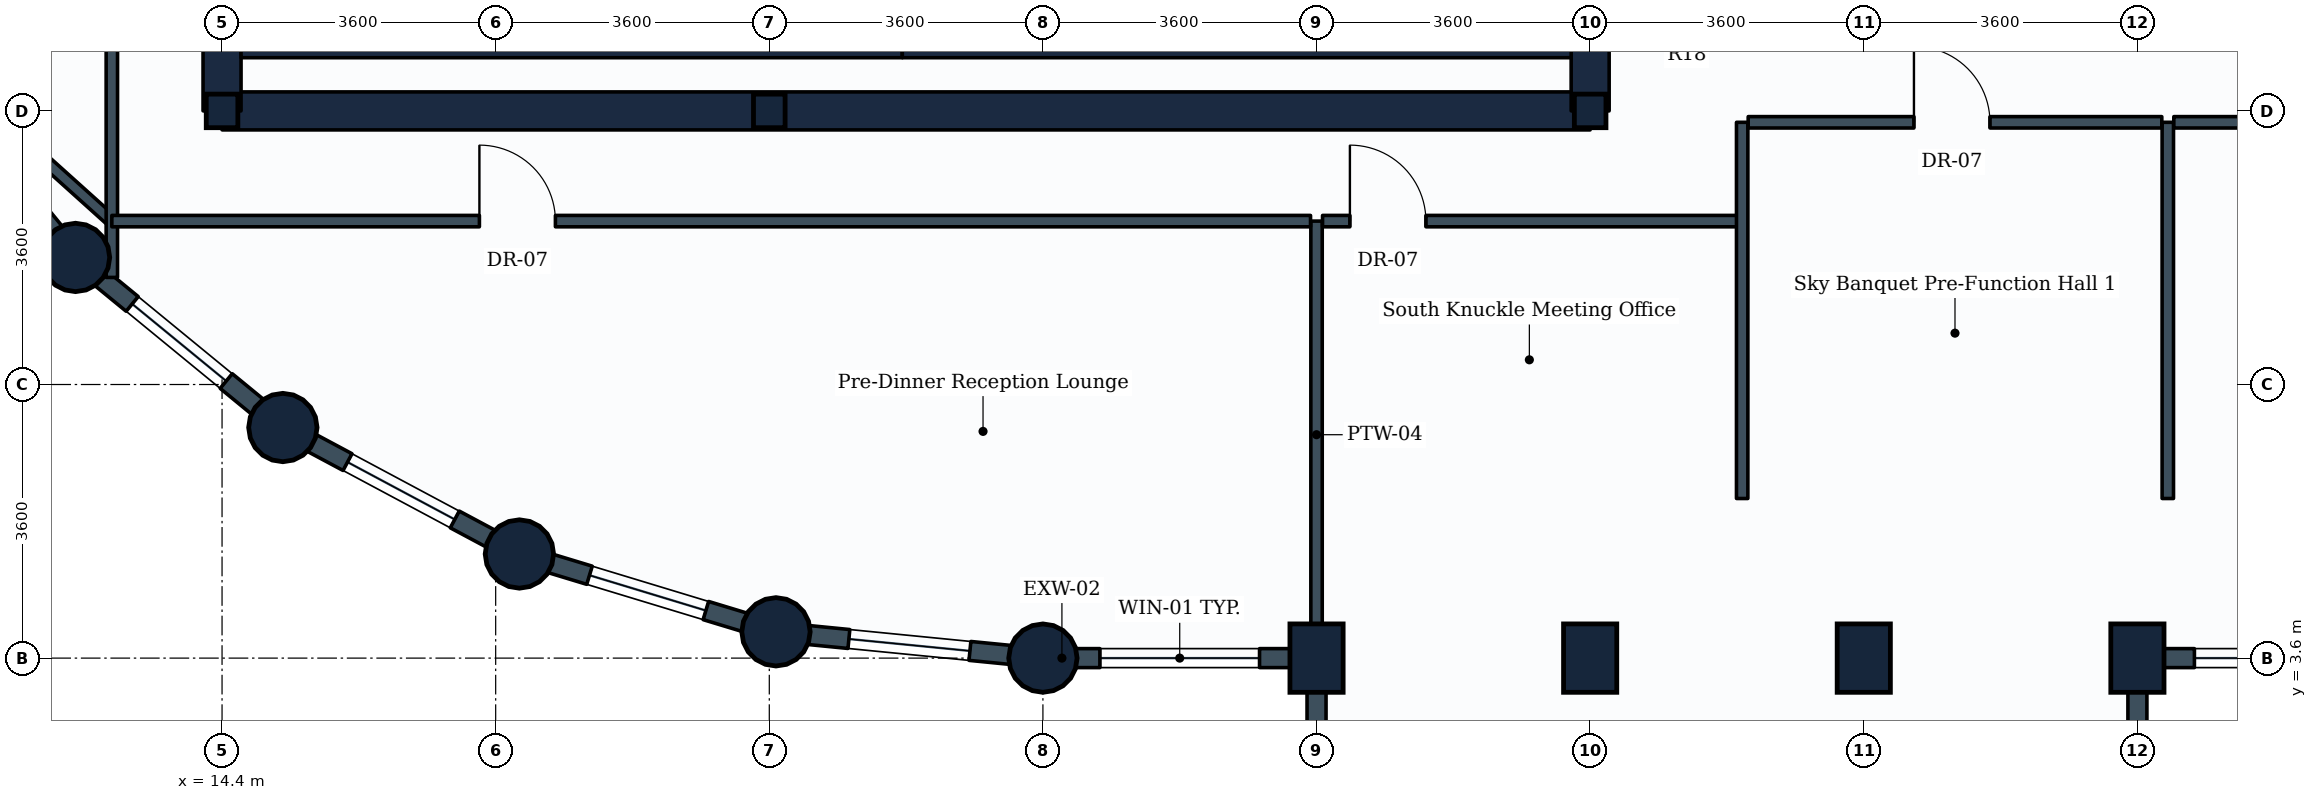
"""IFC4 building model, lengths in metres.
Left out: names, types, materials, properties, quantities, classifications, styles, units other than length and angle.
Written with IfcOpenShell. Run it as: python <this file> out.ifc"""

import sys

from ifc_helpers import new_model, si_unit, direction, frame, frame_2d, origin, origin_2d, place, context, subcontext, project, spatial, rectangle, circle, i_section, extrude, element, fill, save


model = new_model("IFC4")
c1 = context("Model", 3, precision=1e-05, world=origin(), true_north=direction((0.0, 1.0)))
c2 = subcontext(c1, "Body", "Model", "MODEL_VIEW")
j1 = project(units=[si_unit("LENGTHUNIT", "METRE"), si_unit("PLANEANGLEUNIT", "RADIAN")], contexts=[c1])
p1 = place(None, origin())
s1 = spatial("IfcSite", under=j1, at=p1, CompositionType="ELEMENT")
p2 = place(p1, origin())
s2 = spatial("IfcBuilding", under=s1, at=p2, CompositionType="ELEMENT")
p3 = place(p2, frame((0.0, 0.0, 201.4)))
s3 = spatial("IfcBuildingStorey", under=s2, at=p3, CompositionType="ELEMENT", Elevation=201.4)
p4 = place(p3, frame((12.472, 8.872, 0.0), z_axis=(0.0, 0.0, 1.0), x_axis=(1.0, 0.0, 0.0)))
e1 = element("IfcColumn", 1, at=p4, inside=s3, PredefinedType="COLUMN", context=c2, shape_type="SweptSolid", body=[
    extrude(circle(Radius=0.45, at=origin_2d()), origin(), (0.0, 0.0, 1.0), 3.8),
])
p5 = place(p3, frame((14.4, 10.8, 0.0), z_axis=(0.0, 0.0, 1.0), x_axis=(1.0, 0.0, 0.0)))
e2 = element("IfcColumn", 2, at=p5, inside=s3, PredefinedType="COLUMN", context=c2, shape_type="SweptSolid", body=[
    extrude(i_section(OverallWidth=0.416, OverallDepth=0.442, WebThickness=0.025, FlangeThickness=0.041, FilletRadius=0.015, at=origin_2d()), origin(), (0.0, 0.0, 1.0), 3.8),
])
for number, where, z_axis, x_axis in (
    (3, (15.2, 6.634, 0.0), (0.0, 0.0, 1.0), (1.0, 0.0, 0.0)),
    (4, (18.312, 4.97, 0.0), (0.0, 0.0, 1.0), (1.0, 0.0, 0.0)),
):
    element("IfcColumn", number, at=place(p3, frame(where, z_axis=z_axis, x_axis=x_axis)), inside=s3, PredefinedType="COLUMN", context=c2, shape_type="SweptSolid", body=[
        extrude(circle(Radius=0.45, at=origin_2d()), origin(), (0.0, 0.0, 1.0), 3.8),
    ])
p6 = place(p3, frame((21.6, 10.8, 0.0), z_axis=(0.0, 0.0, 1.0), x_axis=(1.0, 0.0, 0.0)))
e5 = element("IfcColumn", 5, at=p6, inside=s3, PredefinedType="COLUMN", context=c2, shape_type="SweptSolid", body=[
    extrude(i_section(OverallWidth=0.416, OverallDepth=0.442, WebThickness=0.025, FlangeThickness=0.041, FilletRadius=0.015, at=origin_2d()), origin(), (0.0, 0.0, 1.0), 3.8),
])
for number, where, z_axis, x_axis in (
    (6, (21.688, 3.946, 0.0), (0.0, 0.0, 1.0), (1.0, 0.0, 0.0)),
    (7, (25.2, 3.6, 0.0), (0.0, 0.0, 1.0), (1.0, 0.0, 0.0)),
):
    element("IfcColumn", number, at=place(p3, frame(where, z_axis=z_axis, x_axis=x_axis)), inside=s3, PredefinedType="COLUMN", context=c2, shape_type="SweptSolid", body=[
        extrude(circle(Radius=0.45, at=origin_2d()), origin(), (0.0, 0.0, 1.0), 3.8),
    ])
for number, where, z_axis, x_axis in (
    (8, (28.8, 3.6, 0.0), (0.0, 0.0, 1.0), (1.0, 0.0, 0.0)),
    (9, (32.4, 3.6, 0.0), (0.0, 0.0, 1.0), (1.0, 0.0, 0.0)),
):
    element("IfcColumn", number, at=place(p3, frame(where, z_axis=z_axis, x_axis=x_axis)), inside=s3, PredefinedType="COLUMN", context=c2, shape_type="SweptSolid", body=[
        extrude(rectangle(XDim=0.7, YDim=0.9, at=origin_2d()), origin(), (0.0, 0.0, 1.0), 3.8),
    ])
p7 = place(p3, frame((32.4, 10.8, 0.0), z_axis=(0.0, 0.0, 1.0), x_axis=(1.0, 0.0, 0.0)))
e10 = element("IfcColumn", 10, at=p7, inside=s3, PredefinedType="COLUMN", context=c2, shape_type="SweptSolid", body=[
    extrude(i_section(OverallWidth=0.416, OverallDepth=0.442, WebThickness=0.025, FlangeThickness=0.041, FilletRadius=0.015, at=origin_2d()), origin(), (0.0, 0.0, 1.0), 3.8),
])
for number, where, z_axis, x_axis in (
    (11, (36.0, 3.6, 0.0), (0.0, 0.0, 1.0), (1.0, 0.0, 0.0)),
    (12, (39.6, 3.6, 0.0), (0.0, 0.0, 1.0), (1.0, 0.0, 0.0)),
):
    element("IfcColumn", number, at=place(p3, frame(where, z_axis=z_axis, x_axis=x_axis)), inside=s3, PredefinedType="COLUMN", context=c2, shape_type="SweptSolid", body=[
        extrude(rectangle(XDim=0.7, YDim=0.9, at=origin_2d()), origin(), (0.0, 0.0, 1.0), 3.8),
    ])
p8 = place(p3, frame((28.8, 3.6, 0.0), z_axis=(0.0, 0.0, 1.0), x_axis=(-1.0, 0.0, 0.0)))
e13 = element("IfcWall", 13, at=p8, inside=s3, PredefinedType="STANDARD", context=c2, shape_type="SweptSolid", body=[
    extrude(rectangle(XDim=3.6, YDim=0.25, at=frame_2d((1.8, 0.0))), origin(), (0.0, 0.0, 1.0), 2.93),
])
p9 = place(p8, frame((0.75, 0.0, 0.85)))
e14 = element("IfcOpeningElement", 14, at=p9, cuts=e13, PredefinedType="OPENING", context=c2, shape_type="SweptSolid", body=[
    extrude(rectangle(XDim=2.1, YDim=1.35, at=frame_2d((1.05, 0.675))), frame((0.0, 0.135, 0.0), z_axis=(0.0, -1.0, 0.0), x_axis=(1.0, 0.0, 0.0)), (0.0, 0.0, 1.0), 0.27),
])
for number, where, z_axis, x_axis in (
    (15, (28.8, 3.6, 0.0), (0.0, 0.0, 1.0), (0.0, -1.0, 0.0)),
    (16, (39.6, 3.6, 0.0), (0.0, 0.0, 1.0), (0.0, -1.0, 0.0)),
):
    element("IfcWall", number, at=place(p3, frame(where, z_axis=z_axis, x_axis=x_axis)), inside=s3, PredefinedType="STANDARD", context=c2, shape_type="SweptSolid", body=[
        extrude(rectangle(XDim=2.1, YDim=0.25, at=frame_2d((1.05, 0.0))), origin(), (0.0, 0.0, 1.0), 2.93),
    ])
p10 = place(p3, frame((43.2, 3.6, 0.0), z_axis=(0.0, 0.0, 1.0), x_axis=(-1.0, 0.0, 0.0)))
e17 = element("IfcWall", 17, at=p10, inside=s3, PredefinedType="STANDARD", context=c2, shape_type="SweptSolid", body=[
    extrude(rectangle(XDim=3.6, YDim=0.25, at=frame_2d((1.8, 0.0))), origin(), (0.0, 0.0, 1.0), 2.93),
])
p11 = place(p10, frame((0.75, 0.0, 0.85)))
e18 = element("IfcOpeningElement", 18, at=p11, cuts=e17, PredefinedType="OPENING", context=c2, shape_type="SweptSolid", body=[
    extrude(rectangle(XDim=2.1, YDim=1.35, at=frame_2d((1.05, 0.675))), frame((0.0, 0.135, 0.0), z_axis=(0.0, -1.0, 0.0), x_axis=(1.0, 0.0, 0.0)), (0.0, 0.0, 1.0), 0.27),
])
p12 = place(p3, frame((12.472, 8.872, 0.0), z_axis=(0.0, 0.0, 1.0), x_axis=(-0.634258295121, 0.773121216285, 0.0)))
e19 = element("IfcWall", 19, at=p12, inside=s3, PredefinedType="STANDARD", context=c2, shape_type="SweptSolid", body=[
    extrude(rectangle(XDim=3.529, YDim=0.25, at=frame_2d((1.764, 0.0))), origin(), (0.0, 0.0, 1.0), 2.93),
])
p13 = place(p12, frame((0.964, 0.0, 0.85)))
e20 = element("IfcOpeningElement", 20, at=p13, cuts=e19, PredefinedType="OPENING", context=c2, shape_type="SweptSolid", body=[
    extrude(rectangle(XDim=1.6, YDim=1.35, at=frame_2d((0.8, 0.675))), frame((0.0, 0.135, 0.0), z_axis=(0.0, -1.0, 0.0), x_axis=(1.0, 0.0, 0.0)), (0.0, 0.0, 1.0), 0.27),
])
p14 = place(p3, frame((15.2, 6.634, 0.0), z_axis=(0.0, 0.0, 1.0), x_axis=(-0.773121216285, 0.634258295121, 0.0)))
e21 = element("IfcWall", 21, at=p14, inside=s3, PredefinedType="STANDARD", context=c2, shape_type="SweptSolid", body=[
    extrude(rectangle(XDim=3.529, YDim=0.25, at=frame_2d((1.764, 0.0))), origin(), (0.0, 0.0, 1.0), 2.93),
])
p15 = place(p14, frame((0.964, 0.0, 0.85)))
e22 = element("IfcOpeningElement", 22, at=p15, cuts=e21, PredefinedType="OPENING", context=c2, shape_type="SweptSolid", body=[
    extrude(rectangle(XDim=1.6, YDim=1.35, at=frame_2d((0.8, 0.675))), frame((0.0, 0.135, 0.0), z_axis=(0.0, -1.0, 0.0), x_axis=(1.0, 0.0, 0.0)), (0.0, 0.0, 1.0), 0.27),
])
p16 = place(p3, frame((18.312, 4.97, 0.0), z_axis=(0.0, 0.0, 1.0), x_axis=(-0.881846862014, 0.471535907389, 0.0)))
e23 = element("IfcWall", 23, at=p16, inside=s3, PredefinedType="STANDARD", context=c2, shape_type="SweptSolid", body=[
    extrude(rectangle(XDim=3.529, YDim=0.25, at=frame_2d((1.765, 0.0))), origin(), (0.0, 0.0, 1.0), 2.93),
])
p17 = place(p16, frame((0.964, 0.0, 0.85)))
e24 = element("IfcOpeningElement", 24, at=p17, cuts=e23, PredefinedType="OPENING", context=c2, shape_type="SweptSolid", body=[
    extrude(rectangle(XDim=1.6, YDim=1.35, at=frame_2d((0.8, 0.675))), frame((0.0, 0.135, 0.0), z_axis=(0.0, -1.0, 0.0), x_axis=(1.0, 0.0, 0.0)), (0.0, 0.0, 1.0), 0.27),
])
p18 = place(p3, frame((21.688, 3.946, 0.0), z_axis=(0.0, 0.0, 1.0), x_axis=(-0.956953367403, 0.290241714123, 0.0)))
e25 = element("IfcWall", 25, at=p18, inside=s3, PredefinedType="STANDARD", context=c2, shape_type="SweptSolid", body=[
    extrude(rectangle(XDim=3.528, YDim=0.25, at=frame_2d((1.764, 0.0))), origin(), (0.0, 0.0, 1.0), 2.93),
])
p19 = place(p18, frame((0.964, 0.0, 0.85)))
e26 = element("IfcOpeningElement", 26, at=p19, cuts=e25, PredefinedType="OPENING", context=c2, shape_type="SweptSolid", body=[
    extrude(rectangle(XDim=1.6, YDim=1.35, at=frame_2d((0.8, 0.675))), frame((0.0, 0.135, 0.0), z_axis=(0.0, -1.0, 0.0), x_axis=(1.0, 0.0, 0.0)), (0.0, 0.0, 1.0), 0.27),
])
p20 = place(p3, frame((25.2, 3.6, 0.0), z_axis=(0.0, 0.0, 1.0), x_axis=(-0.995183369056, 0.098030923459, 0.0)))
e27 = element("IfcWall", 27, at=p20, inside=s3, PredefinedType="STANDARD", context=c2, shape_type="SweptSolid", body=[
    extrude(rectangle(XDim=3.529, YDim=0.25, at=frame_2d((1.765, 0.0))), origin(), (0.0, 0.0, 1.0), 2.93),
])
p21 = place(p20, frame((0.965, 0.0, 0.85)))
e28 = element("IfcOpeningElement", 28, at=p21, cuts=e27, PredefinedType="OPENING", context=c2, shape_type="SweptSolid", body=[
    extrude(rectangle(XDim=1.6, YDim=1.35, at=frame_2d((0.8, 0.675))), frame((0.0, 0.135, 0.0), z_axis=(0.0, -1.0, 0.0), x_axis=(1.0, 0.0, 0.0)), (0.0, 0.0, 1.0), 0.27),
])
p22 = place(p3, frame((14.4, 10.8, 0.0), z_axis=(0.0, 0.0, 1.0), x_axis=(1.0, 0.0, 0.0)))
e29 = element("IfcWall", 29, at=p22, inside=s3, PredefinedType="SHEAR", context=c2, shape_type="SweptSolid", body=[
    extrude(rectangle(XDim=18.0, YDim=0.5, at=frame_2d((9.0, 0.0))), origin(), (0.0, 0.0, 1.0), 3.55),
])
p23 = place(p3, frame((14.4, 10.8, 0.0), z_axis=(0.0, 0.0, 1.0), x_axis=(0.0, 1.0, 0.0)))
e30 = element("IfcWall", 30, at=p23, inside=s3, PredefinedType="SHEAR", context=c2, shape_type="SweptSolid", body=[
    extrude(rectangle(XDim=14.4, YDim=0.5, at=frame_2d((7.2, 0.0))), origin(), (0.0, 0.0, 1.0), 3.55),
])
p24 = place(p23, frame((11.05, 0.0, 0.0)))
e31 = element("IfcOpeningElement", 31, at=p24, cuts=e30, PredefinedType="OPENING", context=c2, shape_type="SweptSolid", body=[
    extrude(rectangle(XDim=1.1, YDim=2.1, at=frame_2d((0.55, 1.05))), frame((0.0, 0.26, 0.0), z_axis=(0.0, -1.0, 0.0), x_axis=(1.0, 0.0, 0.0)), (0.0, 0.0, 1.0), 0.52),
])
p25 = place(p23, frame((4.9, 0.0, 0.0)))
e32 = element("IfcOpeningElement", 32, at=p25, cuts=e30, PredefinedType="OPENING", context=c2, shape_type="SweptSolid", body=[
    extrude(rectangle(XDim=1.2, YDim=2.1, at=frame_2d((0.6, 1.05))), frame((0.0, 0.26, 0.0), z_axis=(0.0, -1.0, 0.0), x_axis=(1.0, 0.0, 0.0)), (0.0, 0.0, 1.0), 0.52),
])
p26 = place(p3, frame((32.4, 10.8, 0.0), z_axis=(0.0, 0.0, 1.0), x_axis=(0.0, 1.0, 0.0)))
e33 = element("IfcWall", 33, at=p26, inside=s3, PredefinedType="SHEAR", context=c2, shape_type="SweptSolid", body=[
    extrude(rectangle(XDim=14.4, YDim=0.5, at=frame_2d((7.2, 0.0))), origin(), (0.0, 0.0, 1.0), 3.55),
])
p27 = place(p26, frame((4.35, 0.0, 0.0)))
e34 = element("IfcOpeningElement", 34, at=p27, cuts=e33, PredefinedType="OPENING", context=c2, shape_type="SweptSolid", body=[
    extrude(rectangle(XDim=1.2, YDim=2.1, at=frame_2d((0.6, 1.05))), frame((0.0, 0.26, 0.0), z_axis=(0.0, -1.0, 0.0), x_axis=(1.0, 0.0, 0.0)), (0.0, 0.0, 1.0), 0.52),
])
p28 = place(p26, frame((10.0, 0.0, 0.0)))
e35 = element("IfcOpeningElement", 35, at=p28, cuts=e33, PredefinedType="OPENING", context=c2, shape_type="SweptSolid", body=[
    extrude(rectangle(XDim=1.2, YDim=2.1, at=frame_2d((0.6, 1.05))), frame((0.0, 0.26, 0.0), z_axis=(0.0, -1.0, 0.0), x_axis=(1.0, 0.0, 0.0)), (0.0, 0.0, 1.0), 0.52),
])
p29 = place(p3, frame((14.65, 11.625, 0.0), z_axis=(0.0, 0.0, 1.0), x_axis=(1.0, 0.0, 0.0)))
e36 = element("IfcWall", 36, at=p29, inside=s3, PredefinedType="SHEAR", context=c2, shape_type="SweptSolid", body=[
    extrude(rectangle(XDim=8.7, YDim=0.25, at=frame_2d((4.35, 0.0))), origin(), (0.0, 0.0, 1.0), 3.55),
])
p30 = place(p3, frame((23.35, 11.625, 0.0), z_axis=(0.0, 0.0, 1.0), x_axis=(1.0, 0.0, 0.0)))
e37 = element("IfcWall", 37, at=p30, inside=s3, PredefinedType="SHEAR", context=c2, shape_type="SweptSolid", body=[
    extrude(rectangle(XDim=8.8, YDim=0.25, at=frame_2d((4.4, 0.0))), origin(), (0.0, 0.0, 1.0), 3.55),
])
p31 = place(p3, frame((28.8, 9.35, 0.0), z_axis=(0.0, 0.0, 1.0), x_axis=(0.0, -1.0, 0.0)))
e38 = element("IfcWall", 38, at=p31, inside=s3, PredefinedType="PARTITIONING", context=c2, shape_type="SweptSolid", body=[
    extrude(rectangle(XDim=5.621, YDim=0.15, at=frame_2d((2.811, 0.0))), origin(), (0.0, 0.0, 1.0), 3.535),
])
p32 = place(p3, frame((12.95, 9.35, 0.0), z_axis=(0.0, 0.0, 1.0), x_axis=(-0.74362269849, 0.668599493187, 0.0)))
e39 = element("IfcWall", 39, at=p32, inside=s3, PredefinedType="PARTITIONING", context=c2, shape_type="SweptSolid", body=[
    extrude(rectangle(XDim=3.472, YDim=0.15, at=frame_2d((1.736, 0.0))), origin(), (0.0, 0.0, 1.0), 2.93),
])
p33 = place(p3, frame((12.95, 8.609, 0.0), z_axis=(0.0, 0.0, 1.0), x_axis=(0.0, 1.0, 0.0)))
e40 = element("IfcWall", 40, at=p33, inside=s3, PredefinedType="PARTITIONING", context=c2, shape_type="SweptSolid", body=[
    extrude(rectangle(XDim=7.912, YDim=0.15, at=frame_2d((3.956, 0.0))), origin(), (0.0, 0.0, 1.0), 2.93),
])
p34 = place(p33, frame((4.972, 0.0, 0.0)))
e41 = element("IfcOpeningElement", 41, at=p34, cuts=e40, PredefinedType="OPENING", context=c2, shape_type="SweptSolid", body=[
    extrude(rectangle(XDim=1.0, YDim=2.1, at=frame_2d((0.5, 1.05))), frame((0.0, 0.085, 0.0), z_axis=(0.0, -1.0, 0.0), x_axis=(1.0, 0.0, 0.0)), (0.0, 0.0, 1.0), 0.17),
])
p35 = place(p3, frame((12.95, 9.35, 0.0), z_axis=(0.0, 0.0, 1.0), x_axis=(1.0, 0.0, 0.0)))
e42 = element("IfcWall", 42, at=p35, inside=s3, PredefinedType="PARTITIONING", context=c2, shape_type="SweptSolid", body=[
    extrude(rectangle(XDim=15.771, YDim=0.15, at=frame_2d((7.885, 0.0))), origin(), (0.0, 0.0, 1.0), 3.17),
])
p36 = place(p35, frame((4.836, 0.0, 0.0)))
e43 = element("IfcOpeningElement", 43, at=p36, cuts=e42, PredefinedType="OPENING", context=c2, shape_type="SweptSolid", body=[
    extrude(rectangle(XDim=1.0, YDim=2.1, at=frame_2d((0.5, 1.05))), frame((0.0, 0.085, 0.0), z_axis=(0.0, -1.0, 0.0), x_axis=(1.0, 0.0, 0.0)), (0.0, 0.0, 1.0), 0.17),
])
p37 = place(p3, frame((28.879, 9.35, 0.0), z_axis=(0.0, 0.0, 1.0), x_axis=(1.0, 0.0, 0.0)))
e44 = element("IfcWall", 44, at=p37, inside=s3, PredefinedType="PARTITIONING", context=c2, shape_type="SweptSolid", body=[
    extrude(rectangle(XDim=5.521, YDim=0.15, at=frame_2d((2.76, 0.0))), origin(), (0.0, 0.0, 1.0), 3.535),
])
p38 = place(p37, frame((0.36, 0.0, 0.0)))
e45 = element("IfcOpeningElement", 45, at=p38, cuts=e44, PredefinedType="OPENING", context=c2, shape_type="SweptSolid", body=[
    extrude(rectangle(XDim=1.0, YDim=2.1, at=frame_2d((0.5, 1.05))), frame((0.0, 0.085, 0.0), z_axis=(0.0, -1.0, 0.0), x_axis=(1.0, 0.0, 0.0)), (0.0, 0.0, 1.0), 0.17),
])
p39 = place(p3, frame((34.4, 5.7, 0.0), z_axis=(0.0, 0.0, 1.0), x_axis=(0.0, 1.0, 0.0)))
e46 = element("IfcWall", 46, at=p39, inside=s3, PredefinedType="PARTITIONING", context=c2, shape_type="SweptSolid", body=[
    extrude(rectangle(XDim=4.95, YDim=0.15, at=frame_2d((2.475, 0.0))), origin(), (0.0, 0.0, 1.0), 3.535),
])
p40 = place(p3, frame((40.0, 5.7, 0.0), z_axis=(0.0, 0.0, 1.0), x_axis=(0.0, 1.0, 0.0)))
e47 = element("IfcWall", 47, at=p40, inside=s3, PredefinedType="PARTITIONING", context=c2, shape_type="SweptSolid", body=[
    extrude(rectangle(XDim=4.95, YDim=0.15, at=frame_2d((2.475, 0.0))), origin(), (0.0, 0.0, 1.0), 3.2),
])
p41 = place(p3, frame((34.479, 10.65, 0.0), z_axis=(0.0, 0.0, 1.0), x_axis=(1.0, 0.0, 0.0)))
e48 = element("IfcWall", 48, at=p41, inside=s3, PredefinedType="PARTITIONING", context=c2, shape_type="SweptSolid", body=[
    extrude(rectangle(XDim=5.442, YDim=0.15, at=frame_2d((2.721, 0.0))), origin(), (0.0, 0.0, 1.0), 3.17),
])
p42 = place(p41, frame((2.181, 0.0, 0.0)))
e49 = element("IfcOpeningElement", 49, at=p42, cuts=e48, PredefinedType="OPENING", context=c2, shape_type="SweptSolid", body=[
    extrude(rectangle(XDim=1.0, YDim=2.1, at=frame_2d((0.5, 1.05))), frame((0.0, 0.085, 0.0), z_axis=(0.0, -1.0, 0.0), x_axis=(1.0, 0.0, 0.0)), (0.0, 0.0, 1.0), 0.17),
])
p43 = place(p3, frame((40.079, 10.65, 0.0), z_axis=(0.0, 0.0, 1.0), x_axis=(1.0, 0.0, 0.0)))
e50 = element("IfcWall", 50, at=p43, inside=s3, PredefinedType="PARTITIONING", context=c2, shape_type="SweptSolid", body=[
    extrude(rectangle(XDim=5.442, YDim=0.15, at=frame_2d((2.721, 0.0))), origin(), (0.0, 0.0, 1.0), 3.17),
])
p44 = place(p43, frame((2.181, 0.0, 0.0)))
e51 = element("IfcOpeningElement", 51, at=p44, cuts=e50, PredefinedType="OPENING", context=c2, shape_type="SweptSolid", body=[
    extrude(rectangle(XDim=1.0, YDim=2.1, at=frame_2d((0.5, 1.05))), frame((0.0, 0.085, 0.0), z_axis=(0.0, -1.0, 0.0), x_axis=(1.0, 0.0, 0.0)), (0.0, 0.0, 1.0), 0.17),
])
p45 = place(p9, origin())
e52 = element("IfcWindow", 52, at=p45, inside=s3, PartitioningType="SINGLE_PANEL", PredefinedType="WINDOW", context=c2, shape_type="SweptSolid", body=[
    extrude(rectangle(XDim=2.1, YDim=1.35, at=frame_2d((1.05, 0.675))), frame((0.0, 0.03, 0.0), z_axis=(0.0, -1.0, 0.0), x_axis=(1.0, 0.0, 0.0)), (0.0, 0.0, 1.0), 0.06),
])
fill(e14, e52)
p46 = place(p11, origin())
e53 = element("IfcWindow", 53, at=p46, inside=s3, PartitioningType="SINGLE_PANEL", PredefinedType="WINDOW", context=c2, shape_type="SweptSolid", body=[
    extrude(rectangle(XDim=2.1, YDim=1.35, at=frame_2d((1.05, 0.675))), frame((0.0, 0.03, 0.0), z_axis=(0.0, -1.0, 0.0), x_axis=(1.0, 0.0, 0.0)), (0.0, 0.0, 1.0), 0.06),
])
fill(e18, e53)
p47 = place(p15, origin())
e54 = element("IfcWindow", 54, at=p47, inside=s3, PartitioningType="SINGLE_PANEL", PredefinedType="WINDOW", context=c2, shape_type="SweptSolid", body=[
    extrude(rectangle(XDim=1.6, YDim=1.35, at=frame_2d((0.8, 0.675))), frame((0.0, 0.03, 0.0), z_axis=(0.0, -1.0, 0.0), x_axis=(1.0, 0.0, 0.0)), (0.0, 0.0, 1.0), 0.06),
])
fill(e22, e54)
p48 = place(p17, origin())
e55 = element("IfcWindow", 55, at=p48, inside=s3, PartitioningType="SINGLE_PANEL", PredefinedType="WINDOW", context=c2, shape_type="SweptSolid", body=[
    extrude(rectangle(XDim=1.6, YDim=1.35, at=frame_2d((0.8, 0.675))), frame((0.0, 0.03, 0.0), z_axis=(0.0, -1.0, 0.0), x_axis=(1.0, 0.0, 0.0)), (0.0, 0.0, 1.0), 0.06),
])
fill(e24, e55)
p49 = place(p19, origin())
e56 = element("IfcWindow", 56, at=p49, inside=s3, PartitioningType="SINGLE_PANEL", PredefinedType="WINDOW", context=c2, shape_type="SweptSolid", body=[
    extrude(rectangle(XDim=1.6, YDim=1.35, at=frame_2d((0.8, 0.675))), frame((0.0, 0.03, 0.0), z_axis=(0.0, -1.0, 0.0), x_axis=(1.0, 0.0, 0.0)), (0.0, 0.0, 1.0), 0.06),
])
fill(e26, e56)
p50 = place(p21, origin())
e57 = element("IfcWindow", 57, at=p50, inside=s3, PartitioningType="SINGLE_PANEL", PredefinedType="WINDOW", context=c2, shape_type="SweptSolid", body=[
    extrude(rectangle(XDim=1.6, YDim=1.35, at=frame_2d((0.8, 0.675))), frame((0.0, 0.03, 0.0), z_axis=(0.0, -1.0, 0.0), x_axis=(1.0, 0.0, 0.0)), (0.0, 0.0, 1.0), 0.06),
])
fill(e28, e57)
p51 = place(p36, origin())
e58 = element("IfcDoor", 58, at=p51, inside=s3, OperationType="SINGLE_SWING_LEFT", PredefinedType="DOOR", context=c2, shape_type="SweptSolid", body=[
    extrude(rectangle(XDim=1.0, YDim=2.1, at=frame_2d((0.5, 1.05))), frame((0.0, 0.025, 0.0), z_axis=(0.0, -1.0, 0.0), x_axis=(1.0, 0.0, 0.0)), (0.0, 0.0, 1.0), 0.05),
])
fill(e43, e58)
p52 = place(p38, origin())
e59 = element("IfcDoor", 59, at=p52, inside=s3, OperationType="SINGLE_SWING_LEFT", PredefinedType="DOOR", context=c2, shape_type="SweptSolid", body=[
    extrude(rectangle(XDim=1.0, YDim=2.1, at=frame_2d((0.5, 1.05))), frame((0.0, 0.025, 0.0), z_axis=(0.0, -1.0, 0.0), x_axis=(1.0, 0.0, 0.0)), (0.0, 0.0, 1.0), 0.05),
])
fill(e45, e59)
p53 = place(p42, origin())
e60 = element("IfcDoor", 60, at=p53, inside=s3, OperationType="SINGLE_SWING_LEFT", PredefinedType="DOOR", context=c2, shape_type="SweptSolid", body=[
    extrude(rectangle(XDim=1.0, YDim=2.1, at=frame_2d((0.5, 1.05))), frame((0.0, 0.025, 0.0), z_axis=(0.0, -1.0, 0.0), x_axis=(1.0, 0.0, 0.0)), (0.0, 0.0, 1.0), 0.05),
])
fill(e49, e60)
save(model, sys.argv[1])
